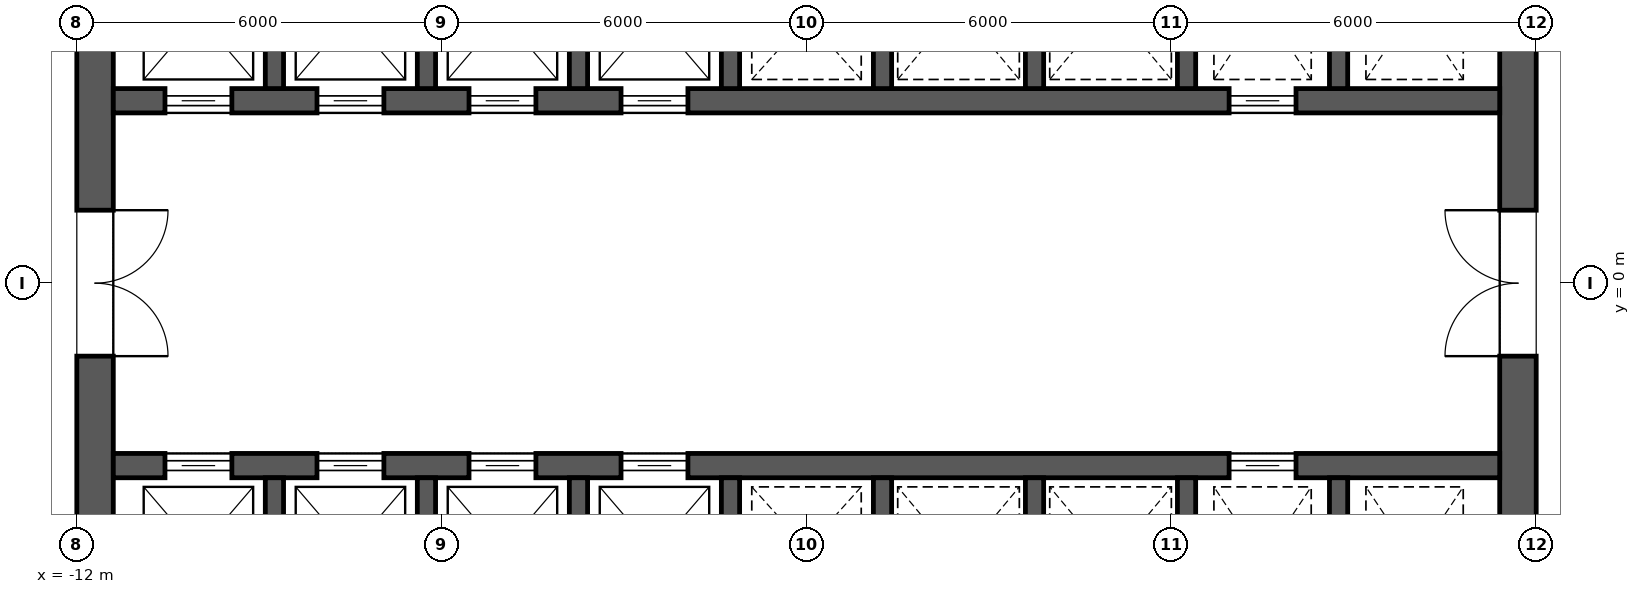
"""IFC4 building model, lengths in metres.
Left out: names, types, materials, properties, quantities, classifications, styles, units other than length and angle.
Written with IfcOpenShell. Run it as: python <this file> out.ifc"""

import sys

from ifc_helpers import new_model, si_unit, direction, frame, frame_2d, origin, place, context, subcontext, project, spatial, rectangle, extrude, element, fill, save


model = new_model("IFC4")
c1 = context("Model", 3, precision=1e-05, world=origin(), true_north=direction((0.0, 1.0)))
c2 = subcontext(c1, "Body", "Model", "MODEL_VIEW")
j1 = project(units=[si_unit("LENGTHUNIT", "METRE"), si_unit("PLANEANGLEUNIT", "RADIAN")], contexts=[c1])
p1 = place(None, origin())
s1 = spatial("IfcSite", under=j1, at=p1, CompositionType="ELEMENT")
p2 = place(p1, origin())
s2 = spatial("IfcBuilding", under=s1, at=p2, CompositionType="ELEMENT")
p3 = place(p2, frame((0.0, 0.0, 112.9)))
s3 = spatial("IfcBuildingStorey", under=s2, at=p3, CompositionType="ELEMENT", Elevation=112.9)
p4 = place(p3, frame((11.7, -11.4, 0.0), z_axis=(0.0, 0.0, 1.0), x_axis=(0.0, 1.0, 0.0)))
e1 = element("IfcWall", 1, at=p4, inside=s3, PredefinedType="SHEAR", context=c2, shape_type="SweptSolid", body=[
    extrude(rectangle(XDim=22.8, YDim=0.6, at=frame_2d((11.4, 0.0))), origin(), (0.0, 0.0, 1.0), 4.2),
])
p5 = place(p4, frame((10.2, 0.0, 0.0)))
e2 = element("IfcOpeningElement", 2, at=p5, cuts=e1, PredefinedType="OPENING", context=c2, shape_type="SweptSolid", body=[
    extrude(rectangle(XDim=2.4, YDim=2.1, at=frame_2d((1.2, 1.05))), frame((0.0, 0.312, 0.0), z_axis=(0.0, -1.0, 0.0), x_axis=(1.0, 0.0, 0.0)), (0.0, 0.0, 1.0), 0.624),
])
p6 = place(p4, frame((19.5, 0.0, 0.0)))
e3 = element("IfcOpeningElement", 3, at=p6, cuts=e1, PredefinedType="OPENING", context=c2, shape_type="SweptSolid", body=[
    extrude(rectangle(XDim=1.2, YDim=2.1, at=frame_2d((0.6, 1.05))), frame((0.0, 0.312, 0.0), z_axis=(0.0, -1.0, 0.0), x_axis=(1.0, 0.0, 0.0)), (0.0, 0.0, 1.0), 0.624),
])
p7 = place(p4, frame((2.1, 0.0, 0.0)))
e4 = element("IfcOpeningElement", 4, at=p7, cuts=e1, PredefinedType="OPENING", context=c2, shape_type="SweptSolid", body=[
    extrude(rectangle(XDim=1.2, YDim=2.1, at=frame_2d((0.6, 1.05))), frame((0.0, 0.312, 0.0), z_axis=(0.0, -1.0, 0.0), x_axis=(1.0, 0.0, 0.0)), (0.0, 0.0, 1.0), 0.624),
])
p8 = place(p3, frame((-11.7, -11.4, 0.0), z_axis=(0.0, 0.0, 1.0), x_axis=(0.0, 1.0, 0.0)))
e5 = element("IfcWall", 5, at=p8, inside=s3, PredefinedType="SHEAR", context=c2, shape_type="SweptSolid", body=[
    extrude(rectangle(XDim=22.8, YDim=0.6, at=frame_2d((11.4, 0.0))), origin(), (0.0, 0.0, 1.0), 4.2),
])
p9 = place(p8, frame((10.2, 0.0, 0.0)))
e6 = element("IfcOpeningElement", 6, at=p9, cuts=e5, PredefinedType="OPENING", context=c2, shape_type="SweptSolid", body=[
    extrude(rectangle(XDim=2.4, YDim=2.1, at=frame_2d((1.2, 1.05))), frame((0.0, 0.312, 0.0), z_axis=(0.0, -1.0, 0.0), x_axis=(1.0, 0.0, 0.0)), (0.0, 0.0, 1.0), 0.624),
])
p10 = place(p8, frame((18.925, 0.0, 0.0)))
e7 = element("IfcOpeningElement", 7, at=p10, cuts=e5, PredefinedType="OPENING", context=c2, shape_type="SweptSolid", body=[
    extrude(rectangle(XDim=1.2, YDim=2.1, at=frame_2d((0.6, 1.05))), frame((0.0, 0.312, 0.0), z_axis=(0.0, -1.0, 0.0), x_axis=(1.0, 0.0, 0.0)), (0.0, 0.0, 1.0), 0.624),
])
p11 = place(p8, frame((2.675, 0.0, 0.0)))
e8 = element("IfcOpeningElement", 8, at=p11, cuts=e5, PredefinedType="OPENING", context=c2, shape_type="SweptSolid", body=[
    extrude(rectangle(XDim=1.2, YDim=2.1, at=frame_2d((0.6, 1.05))), frame((0.0, 0.312, 0.0), z_axis=(0.0, -1.0, 0.0), x_axis=(1.0, 0.0, 0.0)), (0.0, 0.0, 1.0), 0.624),
])
p12 = place(p3, frame((-11.4, 3.0, 0.0), z_axis=(0.0, 0.0, 1.0), x_axis=(1.0, 0.0, 0.0)))
e9 = element("IfcWall", 9, at=p12, inside=s3, PredefinedType="SHEAR", context=c2, shape_type="SweptSolid", body=[
    extrude(rectangle(XDim=22.8, YDim=0.4, at=frame_2d((11.4, 0.0))), origin(), (0.0, 0.0, 1.0), 4.2),
])
p13 = place(p12, frame((0.85, 0.0, 0.0)))
e10 = element("IfcOpeningElement", 10, at=p13, cuts=e9, PredefinedType="OPENING", context=c2, shape_type="SweptSolid", body=[
    extrude(rectangle(XDim=1.1, YDim=2.1, at=frame_2d((0.55, 1.05))), frame((0.0, 0.212, 0.0), z_axis=(0.0, -1.0, 0.0), x_axis=(1.0, 0.0, 0.0)), (0.0, 0.0, 1.0), 0.424),
])
p14 = place(p12, frame((3.35, 0.0, 0.0)))
e11 = element("IfcOpeningElement", 11, at=p14, cuts=e9, PredefinedType="OPENING", context=c2, shape_type="SweptSolid", body=[
    extrude(rectangle(XDim=1.1, YDim=2.1, at=frame_2d((0.55, 1.05))), frame((0.0, 0.212, 0.0), z_axis=(0.0, -1.0, 0.0), x_axis=(1.0, 0.0, 0.0)), (0.0, 0.0, 1.0), 0.424),
])
p15 = place(p12, frame((5.85, 0.0, 0.0)))
e12 = element("IfcOpeningElement", 12, at=p15, cuts=e9, PredefinedType="OPENING", context=c2, shape_type="SweptSolid", body=[
    extrude(rectangle(XDim=1.1, YDim=2.1, at=frame_2d((0.55, 1.05))), frame((0.0, 0.212, 0.0), z_axis=(0.0, -1.0, 0.0), x_axis=(1.0, 0.0, 0.0)), (0.0, 0.0, 1.0), 0.424),
])
p16 = place(p12, frame((8.35, 0.0, 0.0)))
e13 = element("IfcOpeningElement", 13, at=p16, cuts=e9, PredefinedType="OPENING", context=c2, shape_type="SweptSolid", body=[
    extrude(rectangle(XDim=1.1, YDim=2.1, at=frame_2d((0.55, 1.05))), frame((0.0, 0.212, 0.0), z_axis=(0.0, -1.0, 0.0), x_axis=(1.0, 0.0, 0.0)), (0.0, 0.0, 1.0), 0.424),
])
p17 = place(p12, frame((18.35, 0.0, 0.0)))
e14 = element("IfcOpeningElement", 14, at=p17, cuts=e9, PredefinedType="OPENING", context=c2, shape_type="SweptSolid", body=[
    extrude(rectangle(XDim=1.1, YDim=2.1, at=frame_2d((0.55, 1.05))), frame((0.0, 0.212, 0.0), z_axis=(0.0, -1.0, 0.0), x_axis=(1.0, 0.0, 0.0)), (0.0, 0.0, 1.0), 0.424),
])
for number, where, z_axis, x_axis in (
    (15, (-8.75, 3.2, 0.0), (0.0, 0.0, 1.0), (0.0, 1.0, 0.0)),
    (16, (-6.25, 3.2, 0.0), (0.0, 0.0, 1.0), (0.0, 1.0, 0.0)),
    (17, (-3.75, 3.2, 0.0), (0.0, 0.0, 1.0), (0.0, 1.0, 0.0)),
    (18, (-1.25, 3.2, 0.0), (0.0, 0.0, 1.0), (0.0, 1.0, 0.0)),
    (19, (1.25, 3.2, 0.0), (0.0, 0.0, 1.0), (0.0, 1.0, 0.0)),
    (20, (3.75, 3.2, 0.0), (0.0, 0.0, 1.0), (0.0, 1.0, 0.0)),
    (21, (6.25, 3.2, 0.0), (0.0, 0.0, 1.0), (0.0, 1.0, 0.0)),
    (22, (8.75, 3.2, 0.0), (0.0, 0.0, 1.0), (0.0, 1.0, 0.0)),
):
    element("IfcWall", number, at=place(p3, frame(where, z_axis=z_axis, x_axis=x_axis)), inside=s3, PredefinedType="SHEAR", context=c2, shape_type="SweptSolid", body=[
        extrude(rectangle(XDim=2.9, YDim=0.3, at=frame_2d((1.45, 0.0))), origin(), (0.0, 0.0, 1.0), 4.2),
    ])
p18 = place(p3, frame((-11.4, -3.0, 0.0), z_axis=(0.0, 0.0, 1.0), x_axis=(1.0, 0.0, 0.0)))
e23 = element("IfcWall", 23, at=p18, inside=s3, PredefinedType="SHEAR", context=c2, shape_type="SweptSolid", body=[
    extrude(rectangle(XDim=22.8, YDim=0.4, at=frame_2d((11.4, 0.0))), origin(), (0.0, 0.0, 1.0), 4.2),
])
p19 = place(p18, frame((0.85, 0.0, 0.0)))
e24 = element("IfcOpeningElement", 24, at=p19, cuts=e23, PredefinedType="OPENING", context=c2, shape_type="SweptSolid", body=[
    extrude(rectangle(XDim=1.1, YDim=2.1, at=frame_2d((0.55, 1.05))), frame((0.0, 0.212, 0.0), z_axis=(0.0, -1.0, 0.0), x_axis=(1.0, 0.0, 0.0)), (0.0, 0.0, 1.0), 0.424),
])
p20 = place(p18, frame((3.35, 0.0, 0.0)))
e25 = element("IfcOpeningElement", 25, at=p20, cuts=e23, PredefinedType="OPENING", context=c2, shape_type="SweptSolid", body=[
    extrude(rectangle(XDim=1.1, YDim=2.1, at=frame_2d((0.55, 1.05))), frame((0.0, 0.212, 0.0), z_axis=(0.0, -1.0, 0.0), x_axis=(1.0, 0.0, 0.0)), (0.0, 0.0, 1.0), 0.424),
])
p21 = place(p18, frame((5.85, 0.0, 0.0)))
e26 = element("IfcOpeningElement", 26, at=p21, cuts=e23, PredefinedType="OPENING", context=c2, shape_type="SweptSolid", body=[
    extrude(rectangle(XDim=1.1, YDim=2.1, at=frame_2d((0.55, 1.05))), frame((0.0, 0.212, 0.0), z_axis=(0.0, -1.0, 0.0), x_axis=(1.0, 0.0, 0.0)), (0.0, 0.0, 1.0), 0.424),
])
p22 = place(p18, frame((8.35, 0.0, 0.0)))
e27 = element("IfcOpeningElement", 27, at=p22, cuts=e23, PredefinedType="OPENING", context=c2, shape_type="SweptSolid", body=[
    extrude(rectangle(XDim=1.1, YDim=2.1, at=frame_2d((0.55, 1.05))), frame((0.0, 0.212, 0.0), z_axis=(0.0, -1.0, 0.0), x_axis=(1.0, 0.0, 0.0)), (0.0, 0.0, 1.0), 0.424),
])
p23 = place(p18, frame((18.35, 0.0, 0.0)))
e28 = element("IfcOpeningElement", 28, at=p23, cuts=e23, PredefinedType="OPENING", context=c2, shape_type="SweptSolid", body=[
    extrude(rectangle(XDim=1.1, YDim=2.1, at=frame_2d((0.55, 1.05))), frame((0.0, 0.212, 0.0), z_axis=(0.0, -1.0, 0.0), x_axis=(1.0, 0.0, 0.0)), (0.0, 0.0, 1.0), 0.424),
])
for number, where, z_axis, x_axis in (
    (29, (-8.75, -6.1, 0.0), (0.0, 0.0, 1.0), (0.0, 1.0, 0.0)),
    (30, (-6.25, -6.1, 0.0), (0.0, 0.0, 1.0), (0.0, 1.0, 0.0)),
    (31, (-3.75, -6.1, 0.0), (0.0, 0.0, 1.0), (0.0, 1.0, 0.0)),
    (32, (-1.25, -6.1, 0.0), (0.0, 0.0, 1.0), (0.0, 1.0, 0.0)),
    (33, (1.25, -6.1, 0.0), (0.0, 0.0, 1.0), (0.0, 1.0, 0.0)),
    (34, (3.75, -6.1, 0.0), (0.0, 0.0, 1.0), (0.0, 1.0, 0.0)),
    (35, (6.25, -6.1, 0.0), (0.0, 0.0, 1.0), (0.0, 1.0, 0.0)),
    (36, (8.75, -6.1, 0.0), (0.0, 0.0, 1.0), (0.0, 1.0, 0.0)),
):
    element("IfcWall", number, at=place(p3, frame(where, z_axis=z_axis, x_axis=x_axis)), inside=s3, PredefinedType="SHEAR", context=c2, shape_type="SweptSolid", body=[
        extrude(rectangle(XDim=2.9, YDim=0.3, at=frame_2d((1.45, 0.0))), origin(), (0.0, 0.0, 1.0), 4.2),
    ])
p24 = place(p13, origin())
e37 = element("IfcDoor", 37, at=p24, inside=s3, OperationType="SLIDING_TO_LEFT", PredefinedType="DOOR", context=c2, shape_type="SweptSolid", body=[
    extrude(rectangle(XDim=1.1, YDim=2.1, at=frame_2d((0.55, 1.05))), frame((0.0, 0.025, 0.0), z_axis=(0.0, -1.0, 0.0), x_axis=(1.0, 0.0, 0.0)), (0.0, 0.0, 1.0), 0.05),
])
fill(e10, e37)
p25 = place(p14, origin())
e38 = element("IfcDoor", 38, at=p25, inside=s3, OperationType="SLIDING_TO_LEFT", PredefinedType="DOOR", context=c2, shape_type="SweptSolid", body=[
    extrude(rectangle(XDim=1.1, YDim=2.1, at=frame_2d((0.55, 1.05))), frame((0.0, 0.025, 0.0), z_axis=(0.0, -1.0, 0.0), x_axis=(1.0, 0.0, 0.0)), (0.0, 0.0, 1.0), 0.05),
])
fill(e11, e38)
p26 = place(p15, origin())
e39 = element("IfcDoor", 39, at=p26, inside=s3, OperationType="SLIDING_TO_LEFT", PredefinedType="DOOR", context=c2, shape_type="SweptSolid", body=[
    extrude(rectangle(XDim=1.1, YDim=2.1, at=frame_2d((0.55, 1.05))), frame((0.0, 0.025, 0.0), z_axis=(0.0, -1.0, 0.0), x_axis=(1.0, 0.0, 0.0)), (0.0, 0.0, 1.0), 0.05),
])
fill(e12, e39)
p27 = place(p16, origin())
e40 = element("IfcDoor", 40, at=p27, inside=s3, OperationType="SLIDING_TO_LEFT", PredefinedType="DOOR", context=c2, shape_type="SweptSolid", body=[
    extrude(rectangle(XDim=1.1, YDim=2.1, at=frame_2d((0.55, 1.05))), frame((0.0, 0.025, 0.0), z_axis=(0.0, -1.0, 0.0), x_axis=(1.0, 0.0, 0.0)), (0.0, 0.0, 1.0), 0.05),
])
fill(e13, e40)
p28 = place(p19, origin())
e41 = element("IfcDoor", 41, at=p28, inside=s3, OperationType="SLIDING_TO_LEFT", PredefinedType="DOOR", context=c2, shape_type="SweptSolid", body=[
    extrude(rectangle(XDim=1.1, YDim=2.1, at=frame_2d((0.55, 1.05))), frame((0.0, 0.025, 0.0), z_axis=(0.0, -1.0, 0.0), x_axis=(1.0, 0.0, 0.0)), (0.0, 0.0, 1.0), 0.05),
])
fill(e24, e41)
p29 = place(p20, origin())
e42 = element("IfcDoor", 42, at=p29, inside=s3, OperationType="SLIDING_TO_LEFT", PredefinedType="DOOR", context=c2, shape_type="SweptSolid", body=[
    extrude(rectangle(XDim=1.1, YDim=2.1, at=frame_2d((0.55, 1.05))), frame((0.0, 0.025, 0.0), z_axis=(0.0, -1.0, 0.0), x_axis=(1.0, 0.0, 0.0)), (0.0, 0.0, 1.0), 0.05),
])
fill(e25, e42)
p30 = place(p21, origin())
e43 = element("IfcDoor", 43, at=p30, inside=s3, OperationType="SLIDING_TO_LEFT", PredefinedType="DOOR", context=c2, shape_type="SweptSolid", body=[
    extrude(rectangle(XDim=1.1, YDim=2.1, at=frame_2d((0.55, 1.05))), frame((0.0, 0.025, 0.0), z_axis=(0.0, -1.0, 0.0), x_axis=(1.0, 0.0, 0.0)), (0.0, 0.0, 1.0), 0.05),
])
fill(e26, e43)
p31 = place(p22, origin())
e44 = element("IfcDoor", 44, at=p31, inside=s3, OperationType="SLIDING_TO_LEFT", PredefinedType="DOOR", context=c2, shape_type="SweptSolid", body=[
    extrude(rectangle(XDim=1.1, YDim=2.1, at=frame_2d((0.55, 1.05))), frame((0.0, 0.025, 0.0), z_axis=(0.0, -1.0, 0.0), x_axis=(1.0, 0.0, 0.0)), (0.0, 0.0, 1.0), 0.05),
])
fill(e27, e44)
p32 = place(p17, origin())
e45 = element("IfcDoor", 45, at=p32, inside=s3, OperationType="SLIDING_TO_LEFT", PredefinedType="DOOR", context=c2, shape_type="SweptSolid", body=[
    extrude(rectangle(XDim=1.1, YDim=2.1, at=frame_2d((0.55, 1.05))), frame((0.0, 0.025, 0.0), z_axis=(0.0, -1.0, 0.0), x_axis=(1.0, 0.0, 0.0)), (0.0, 0.0, 1.0), 0.05),
])
fill(e14, e45)
p33 = place(p23, origin())
e46 = element("IfcDoor", 46, at=p33, inside=s3, OperationType="SLIDING_TO_LEFT", PredefinedType="DOOR", context=c2, shape_type="SweptSolid", body=[
    extrude(rectangle(XDim=1.1, YDim=2.1, at=frame_2d((0.55, 1.05))), frame((0.0, 0.025, 0.0), z_axis=(0.0, -1.0, 0.0), x_axis=(1.0, 0.0, 0.0)), (0.0, 0.0, 1.0), 0.05),
])
fill(e28, e46)
p34 = place(p9, frame((2.4, 0.0, 0.0), z_axis=(0.0, 0.0, 1.0), x_axis=(-1.0, 0.0, 0.0)))
e47 = element("IfcDoor", 47, at=p34, inside=s3, OperationType="DOUBLE_DOOR_SINGLE_SWING", PredefinedType="DOOR", context=c2, shape_type="SweptSolid", body=[
    extrude(rectangle(XDim=2.4, YDim=2.1, at=frame_2d((1.2, 1.05))), frame((0.0, 0.025, 0.0), z_axis=(0.0, -1.0, 0.0), x_axis=(1.0, 0.0, 0.0)), (0.0, 0.0, 1.0), 0.05),
])
fill(e6, e47)
p35 = place(p5, origin())
e48 = element("IfcDoor", 48, at=p35, inside=s3, OperationType="DOUBLE_DOOR_SINGLE_SWING", PredefinedType="DOOR", context=c2, shape_type="SweptSolid", body=[
    extrude(rectangle(XDim=2.4, YDim=2.1, at=frame_2d((1.2, 1.05))), frame((0.0, 0.025, 0.0), z_axis=(0.0, -1.0, 0.0), x_axis=(1.0, 0.0, 0.0)), (0.0, 0.0, 1.0), 0.05),
])
fill(e2, e48)
save(model, sys.argv[1])
